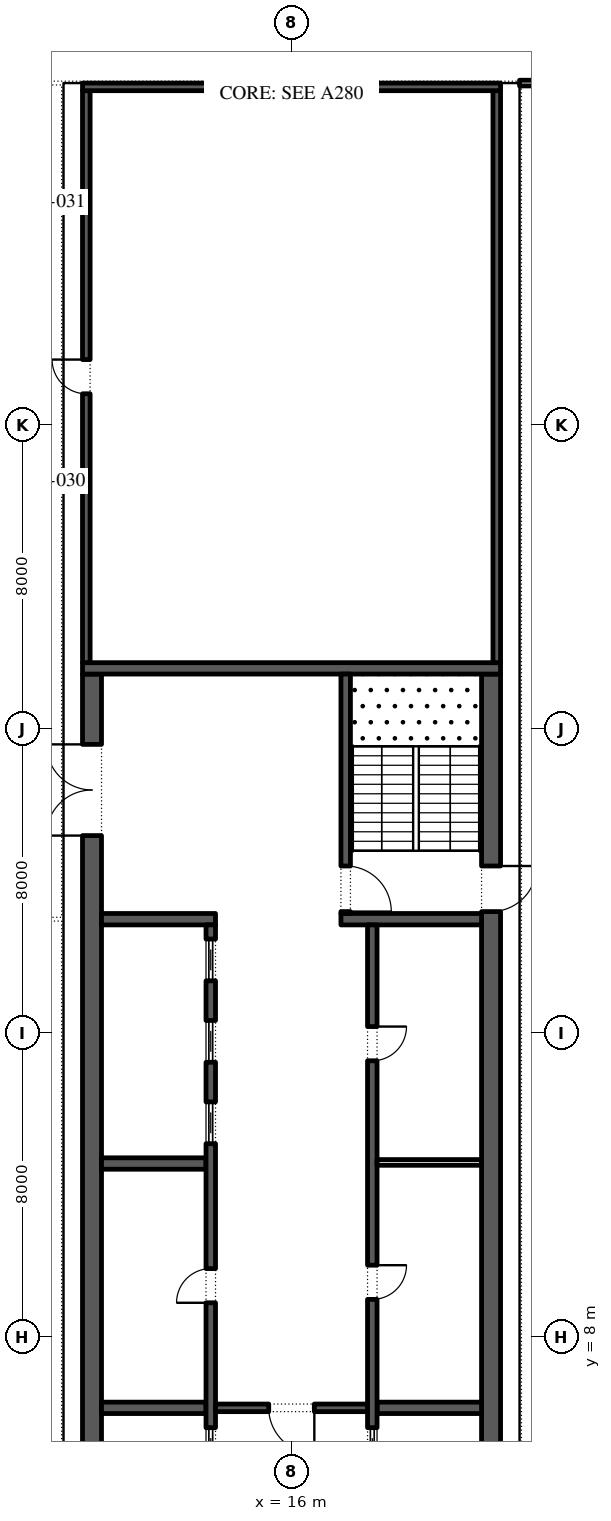
"""IFC4 building model, lengths in metres.
Left out: names, types, materials, properties, quantities, classifications, styles, units other than length and angle.
Written with IfcOpenShell. Run it as: python <this file> out.ifc"""

import sys

from ifc_helpers import new_model, si_unit, direction, frame, frame_2d, origin, place, context, subcontext, project, spatial, rectangle, extrude, element, fill, save


model = new_model("IFC4")
c1 = context("Model", 3, precision=1e-05, world=origin(), true_north=direction((0.0, 1.0)))
c2 = subcontext(c1, "Body", "Model", "MODEL_VIEW")
j1 = project(units=[si_unit("LENGTHUNIT", "METRE"), si_unit("PLANEANGLEUNIT", "RADIAN")], contexts=[c1])
p1 = place(None, origin())
s1 = spatial("IfcSite", under=j1, at=p1, CompositionType="ELEMENT")
p2 = place(p1, origin())
s2 = spatial("IfcBuilding", under=s1, at=p2, CompositionType="ELEMENT")
p3 = place(p2, frame((0.0, 0.0, 351.0)))
s3 = spatial("IfcBuildingStorey", under=s2, at=p3, CompositionType="ELEMENT", Elevation=351.0)
p4 = place(p3, frame((21.25, -2.45, 0.0), z_axis=(0.0, 0.0, 1.0), x_axis=(0.0, 1.0, 0.0)))
e1 = element("IfcWall", 1, at=p4, inside=s3, PredefinedType="SHEAR", context=c2, shape_type="SweptSolid", body=[
    extrude(rectangle(XDim=27.9, YDim=0.5, at=frame_2d((13.95, 0.0))), origin(), (0.0, 0.0, 1.0), 4.0),
])
p5 = place(p4, frame((5.05, 0.0, 0.0)))
e2 = element("IfcOpeningElement", 2, at=p5, cuts=e1, PredefinedType="OPENING", context=c2, shape_type="SweptSolid", body=[
    extrude(rectangle(XDim=1.2, YDim=2.1, at=frame_2d((0.6, 1.05))), frame((0.0, 0.26, 0.0), z_axis=(0.0, -1.0, 0.0), x_axis=(1.0, 0.0, 0.0)), (0.0, 0.0, 1.0), 0.52),
])
p6 = place(p4, frame((21.65, 0.0, 0.0)))
e3 = element("IfcOpeningElement", 3, at=p6, cuts=e1, PredefinedType="OPENING", context=c2, shape_type="SweptSolid", body=[
    extrude(rectangle(XDim=1.2, YDim=2.1, at=frame_2d((0.6, 1.05))), frame((0.0, 0.26, 0.0), z_axis=(0.0, -1.0, 0.0), x_axis=(1.0, 0.0, 0.0)), (0.0, 0.0, 1.0), 0.52),
])
p7 = place(p3, frame((10.75, -2.45, 0.0), z_axis=(0.0, 0.0, 1.0), x_axis=(0.0, 1.0, 0.0)))
e4 = element("IfcWall", 4, at=p7, inside=s3, PredefinedType="SHEAR", context=c2, shape_type="SweptSolid", body=[
    extrude(rectangle(XDim=27.9, YDim=0.5, at=frame_2d((13.95, 0.0))), origin(), (0.0, 0.0, 1.0), 4.0),
])
p8 = place(p7, frame((23.65, 0.0, 0.0)))
e5 = element("IfcOpeningElement", 5, at=p8, cuts=e4, PredefinedType="OPENING", context=c2, shape_type="SweptSolid", body=[
    extrude(rectangle(XDim=2.4, YDim=2.1, at=frame_2d((1.2, 1.05))), frame((0.0, 0.26, 0.0), z_axis=(0.0, -1.0, 0.0), x_axis=(1.0, 0.0, 0.0)), (0.0, 0.0, 1.0), 0.52),
])
p9 = place(p7, frame((0.788, 0.0, 0.0)))
e6 = element("IfcOpeningElement", 6, at=p9, cuts=e4, PredefinedType="OPENING", context=c2, shape_type="SweptSolid", body=[
    extrude(rectangle(XDim=0.9, YDim=2.1, at=frame_2d((0.45, 1.05))), frame((0.0, 0.26, 0.0), z_axis=(0.0, -1.0, 0.0), x_axis=(1.0, 0.0, 0.0)), (0.0, 0.0, 1.0), 0.52),
])
p10 = place(p7, frame((3.962, 0.0, 0.0)))
e7 = element("IfcOpeningElement", 7, at=p10, cuts=e4, PredefinedType="OPENING", context=c2, shape_type="SweptSolid", body=[
    extrude(rectangle(XDim=1.0, YDim=2.1, at=frame_2d((0.5, 1.05))), frame((0.0, 0.26, 0.0), z_axis=(0.0, -1.0, 0.0), x_axis=(1.0, 0.0, 0.0)), (0.0, 0.0, 1.0), 0.52),
])
p11 = place(p3, frame((10.5, 25.6, 0.0), z_axis=(0.0, 0.0, 1.0), x_axis=(1.0, 0.0, 0.0)))
e8 = element("IfcWall", 8, at=p11, inside=s3, PredefinedType="SHEAR", context=c2, shape_type="SweptSolid", body=[
    extrude(rectangle(XDim=11.0, YDim=0.3, at=frame_2d((5.5, 0.0))), origin(), (0.0, 0.0, 1.0), 4.0),
])
p12 = place(p3, frame((17.3, 19.0, 0.0), z_axis=(0.0, 0.0, 1.0), x_axis=(1.0, 0.0, 0.0)))
e9 = element("IfcWall", 9, at=p12, inside=s3, PredefinedType="SHEAR", context=c2, shape_type="SweptSolid", body=[
    extrude(rectangle(XDim=3.7, YDim=0.3, at=frame_2d((1.85, 0.0))), origin(), (0.0, 0.0, 1.0), 4.0),
])
p13 = place(p3, frame((17.425, 19.15, 0.0), z_axis=(0.0, 0.0, 1.0), x_axis=(0.0, 1.0, 0.0)))
e10 = element("IfcWall", 10, at=p13, inside=s3, PredefinedType="SHEAR", context=c2, shape_type="SweptSolid", body=[
    extrude(rectangle(XDim=6.3, YDim=0.25, at=frame_2d((3.15, 0.0))), origin(), (0.0, 0.0, 1.0), 4.0),
])
p14 = place(p13, frame((0.05, 0.0, 0.0)))
e11 = element("IfcOpeningElement", 11, at=p14, cuts=e10, PredefinedType="OPENING", context=c2, shape_type="SweptSolid", body=[
    extrude(rectangle(XDim=1.2, YDim=2.1, at=frame_2d((0.6, 1.05))), frame((0.0, 0.135, 0.0), z_axis=(0.0, -1.0, 0.0), x_axis=(1.0, 0.0, 0.0)), (0.0, 0.0, 1.0), 0.27),
])
p15 = place(p3, frame((18.25, 6.143, 0.0), z_axis=(0.0, 0.0, 1.0), x_axis=(1.0, 0.0, 0.0)))
e12 = element("IfcWall", 12, at=p15, inside=s3, PredefinedType="SHEAR", context=c2, shape_type="SweptSolid", body=[
    extrude(rectangle(XDim=2.75, YDim=0.3, at=frame_2d((1.375, 0.0))), origin(), (0.0, 0.0, 1.0), 4.0),
])
p16 = place(p3, frame((18.125, 4.15, 0.0), z_axis=(0.0, 0.0, 1.0), x_axis=(0.0, 1.0, 0.0)))
e13 = element("IfcWall", 13, at=p16, inside=s3, PredefinedType="SHEAR", context=c2, shape_type="SweptSolid", body=[
    extrude(rectangle(XDim=14.7, YDim=0.25, at=frame_2d((7.35, 0.0))), origin(), (0.0, 0.0, 1.0), 4.0),
])
p17 = place(p16, frame((4.846, 0.0, 0.0)))
e14 = element("IfcOpeningElement", 14, at=p17, cuts=e13, PredefinedType="OPENING", context=c2, shape_type="SweptSolid", body=[
    extrude(rectangle(XDim=0.9, YDim=2.1, at=frame_2d((0.45, 1.05))), frame((0.0, 0.135, 0.0), z_axis=(0.0, -1.0, 0.0), x_axis=(1.0, 0.0, 0.0)), (0.0, 0.0, 1.0), 0.27),
])
p18 = place(p16, frame((11.125, 0.0, 0.0)))
e15 = element("IfcOpeningElement", 15, at=p18, cuts=e13, PredefinedType="OPENING", context=c2, shape_type="SweptSolid", body=[
    extrude(rectangle(XDim=0.9, YDim=2.1, at=frame_2d((0.45, 1.05))), frame((0.0, 0.135, 0.0), z_axis=(0.0, -1.0, 0.0), x_axis=(1.0, 0.0, 0.0)), (0.0, 0.0, 1.0), 0.27),
])
p19 = place(p16, frame((0.371, 0.0, 0.0)))
e16 = element("IfcOpeningElement", 16, at=p19, cuts=e13, PredefinedType="OPENING", context=c2, shape_type="SweptSolid", body=[
    extrude(rectangle(XDim=1.1, YDim=2.1, at=frame_2d((0.55, 1.05))), frame((0.0, 0.135, 0.0), z_axis=(0.0, -1.0, 0.0), x_axis=(1.0, 0.0, 0.0)), (0.0, 0.0, 1.0), 0.27),
])
p20 = place(p3, frame((18.25, 12.6, 0.0), z_axis=(0.0, 0.0, 1.0), x_axis=(1.0, 0.0, 0.0)))
e17 = element("IfcWall", 17, at=p20, inside=s3, PredefinedType="PARTITIONING", context=c2, shape_type="SweptSolid", body=[
    extrude(rectangle(XDim=2.75, YDim=0.15, at=frame_2d((1.375, 0.0))), origin(), (0.0, 0.0, 1.0), 4.0),
])
for number, where, z_axis, x_axis in (
    (18, (11.0, 6.143, 0.0), (0.0, 0.0, 1.0), (1.0, 0.0, 0.0)),
    (19, (11.0, 12.571, 0.0), (0.0, 0.0, 1.0), (1.0, 0.0, 0.0)),
):
    element("IfcWall", number, at=place(p3, frame(where, z_axis=z_axis, x_axis=x_axis)), inside=s3, PredefinedType="SHEAR", context=c2, shape_type="SweptSolid", body=[
        extrude(rectangle(XDim=2.75, YDim=0.3, at=frame_2d((1.375, 0.0))), origin(), (0.0, 0.0, 1.0), 4.0),
    ])
p21 = place(p3, frame((11.0, 19.0, 0.0), z_axis=(0.0, 0.0, 1.0), x_axis=(1.0, 0.0, 0.0)))
e20 = element("IfcWall", 20, at=p21, inside=s3, PredefinedType="SHEAR", context=c2, shape_type="SweptSolid", body=[
    extrude(rectangle(XDim=3.0, YDim=0.3, at=frame_2d((1.5, 0.0))), origin(), (0.0, 0.0, 1.0), 4.0),
])
p22 = place(p3, frame((13.875, -2.45, 0.0), z_axis=(0.0, 0.0, 1.0), x_axis=(0.0, 1.0, 0.0)))
e21 = element("IfcWall", 21, at=p22, inside=s3, PredefinedType="SHEAR", context=c2, shape_type="SweptSolid", body=[
    extrude(rectangle(XDim=21.3, YDim=0.25, at=frame_2d((10.65, 0.0))), origin(), (0.0, 0.0, 1.0), 4.0),
])
p23 = place(p22, frame((11.357, 0.0, 0.0)))
e22 = element("IfcOpeningElement", 22, at=p23, cuts=e21, PredefinedType="OPENING", context=c2, shape_type="SweptSolid", body=[
    extrude(rectangle(XDim=0.9, YDim=2.1, at=frame_2d((0.45, 1.05))), frame((0.0, 0.135, 0.0), z_axis=(0.0, -1.0, 0.0), x_axis=(1.0, 0.0, 0.0)), (0.0, 0.0, 1.0), 0.27),
])
p24 = place(p22, frame((6.971, 0.0, 0.0)))
e23 = element("IfcOpeningElement", 23, at=p24, cuts=e21, PredefinedType="OPENING", context=c2, shape_type="SweptSolid", body=[
    extrude(rectangle(XDim=1.1, YDim=2.1, at=frame_2d((0.55, 1.05))), frame((0.0, 0.135, 0.0), z_axis=(0.0, -1.0, 0.0), x_axis=(1.0, 0.0, 0.0)), (0.0, 0.0, 1.0), 0.27),
])
p25 = place(p22, frame((15.543, 0.0, 0.0)))
e24 = element("IfcOpeningElement", 24, at=p25, cuts=e21, PredefinedType="OPENING", context=c2, shape_type="SweptSolid", body=[
    extrude(rectangle(XDim=1.1, YDim=2.1, at=frame_2d((0.55, 1.05))), frame((0.0, 0.135, 0.0), z_axis=(0.0, -1.0, 0.0), x_axis=(1.0, 0.0, 0.0)), (0.0, 0.0, 1.0), 0.27),
])
p26 = place(p22, frame((17.686, 0.0, 0.0)))
e25 = element("IfcOpeningElement", 25, at=p26, cuts=e21, PredefinedType="OPENING", context=c2, shape_type="SweptSolid", body=[
    extrude(rectangle(XDim=1.1, YDim=2.1, at=frame_2d((0.55, 1.05))), frame((0.0, 0.135, 0.0), z_axis=(0.0, -1.0, 0.0), x_axis=(1.0, 0.0, 0.0)), (0.0, 0.0, 1.0), 0.27),
])
p27 = place(p22, frame((19.829, 0.0, 0.0)))
e26 = element("IfcOpeningElement", 26, at=p27, cuts=e21, PredefinedType="OPENING", context=c2, shape_type="SweptSolid", body=[
    extrude(rectangle(XDim=1.1, YDim=2.1, at=frame_2d((0.55, 1.05))), frame((0.0, 0.135, 0.0), z_axis=(0.0, -1.0, 0.0), x_axis=(1.0, 0.0, 0.0)), (0.0, 0.0, 1.0), 0.27),
])
p28 = place(p3, frame((14.0, 6.143, 0.0), z_axis=(0.0, 0.0, 1.0), x_axis=(1.0, 0.0, 0.0)))
e27 = element("IfcWall", 27, at=p28, inside=s3, PredefinedType="SHEAR", context=c2, shape_type="SweptSolid", body=[
    extrude(rectangle(XDim=4.0, YDim=0.2, at=frame_2d((2.0, 0.0))), origin(), (0.0, 0.0, 1.0), 4.0),
])
p29 = place(p28, frame((1.4, 0.0, 0.0)))
e28 = element("IfcOpeningElement", 28, at=p29, cuts=e27, PredefinedType="OPENING", context=c2, shape_type="SweptSolid", body=[
    extrude(rectangle(XDim=1.2, YDim=2.1, at=frame_2d((0.6, 1.05))), frame((0.0, 0.11, 0.0), z_axis=(0.0, -1.0, 0.0), x_axis=(1.0, 0.0, 0.0)), (0.0, 0.0, 1.0), 0.22),
])
p30 = place(p3, frame((21.4, 25.75, 0.0), z_axis=(0.0, 0.0, 1.0), x_axis=(0.0, 1.0, 0.0)))
e29 = element("IfcWall", 29, at=p30, inside=s3, PredefinedType="SHEAR", context=c2, shape_type="SweptSolid", body=[
    extrude(rectangle(XDim=15.05, YDim=0.2, at=frame_2d((7.525, 0.0))), origin(), (0.0, 0.0, 1.0), 4.0),
])
p31 = place(p3, frame((10.6, 25.75, 0.0), z_axis=(0.0, 0.0, 1.0), x_axis=(0.0, 1.0, 0.0)))
e30 = element("IfcWall", 30, at=p31, inside=s3, PredefinedType="SHEAR", context=c2, shape_type="SweptSolid", body=[
    extrude(rectangle(XDim=15.05, YDim=0.2, at=frame_2d((7.525, 0.0))), origin(), (0.0, 0.0, 1.0), 4.0),
])
p32 = place(p31, frame((7.075, 0.0, 0.0)))
e31 = element("IfcOpeningElement", 31, at=p32, cuts=e30, PredefinedType="OPENING", context=c2, shape_type="SweptSolid", body=[
    extrude(rectangle(XDim=0.9, YDim=2.1, at=frame_2d((0.45, 1.05))), frame((0.0, 0.11, 0.0), z_axis=(0.0, -1.0, 0.0), x_axis=(1.0, 0.0, 0.0)), (0.0, 0.0, 1.0), 0.22),
])
p33 = place(p3, frame((10.5, 40.9, 0.0), z_axis=(0.0, 0.0, 1.0), x_axis=(1.0, 0.0, 0.0)))
e32 = element("IfcWall", 32, at=p33, inside=s3, PredefinedType="SHEAR", context=c2, shape_type="SweptSolid", body=[
    extrude(rectangle(XDim=11.0, YDim=0.2, at=frame_2d((5.5, 0.0))), origin(), (0.0, 0.0, 1.0), 4.0),
])
p34 = place(p3, frame((26.05, 41.0, 0.0), z_axis=(0.0, 0.0, 1.0), x_axis=(-1.0, 0.0, 0.0)))
e33 = element("IfcWall", 33, at=p34, inside=s3, PredefinedType="PARTITIONING", context=c2, shape_type="SweptSolid", body=[
    extrude(rectangle(XDim=4.05, YDim=0.15, at=frame_2d((2.025, 0.0))), origin(), (0.0, 0.0, 1.0), 4.0),
])
p35 = place(p34, frame((1.9, 0.0, 0.0)))
e34 = element("IfcOpeningElement", 34, at=p35, cuts=e33, PredefinedType="OPENING", context=c2, shape_type="SweptSolid", body=[
    extrude(rectangle(XDim=1.0, YDim=2.1, at=frame_2d((0.5, 1.05))), frame((0.0, 0.085, 0.0), z_axis=(0.0, -1.0, 0.0), x_axis=(1.0, 0.0, 0.0)), (0.0, 0.0, 1.0), 0.17),
])
p36 = place(p17, frame((0.9, -0.2, 0.0), z_axis=(0.0, 0.0, 1.0), x_axis=(-1.0, 0.0, 0.0)))
e35 = element("IfcDoor", 35, at=p36, inside=s3, OperationType="SINGLE_SWING_RIGHT", PredefinedType="DOOR", context=c2, shape_type="SweptSolid", body=[
    extrude(rectangle(XDim=0.9, YDim=2.1, at=frame_2d((0.45, 1.05))), frame((0.0, -0.075, 0.0), z_axis=(0.0, -1.0, 0.0), x_axis=(1.0, 0.0, 0.0)), (0.0, 0.0, 1.0), 0.05),
])
fill(e14, e35)
p37 = place(p18, frame((0.9, -0.2, 0.0), z_axis=(0.0, 0.0, 1.0), x_axis=(-1.0, 0.0, 0.0)))
e36 = element("IfcDoor", 36, at=p37, inside=s3, OperationType="SINGLE_SWING_RIGHT", PredefinedType="DOOR", context=c2, shape_type="SweptSolid", body=[
    extrude(rectangle(XDim=0.9, YDim=2.1, at=frame_2d((0.45, 1.05))), frame((0.0, -0.075, 0.0), z_axis=(0.0, -1.0, 0.0), x_axis=(1.0, 0.0, 0.0)), (0.0, 0.0, 1.0), 0.05),
])
fill(e15, e36)
p38 = place(p19, origin())
e37 = element("IfcDoor", 37, at=p38, inside=s3, OperationType="SLIDING_TO_LEFT", PredefinedType="DOOR", context=c2, shape_type="SweptSolid", body=[
    extrude(rectangle(XDim=1.1, YDim=2.1, at=frame_2d((0.55, 1.05))), frame((0.0, 0.025, 0.0), z_axis=(0.0, -1.0, 0.0), x_axis=(1.0, 0.0, 0.0)), (0.0, 0.0, 1.0), 0.05),
])
fill(e16, e37)
p39 = place(p23, origin())
e38 = element("IfcDoor", 38, at=p39, inside=s3, OperationType="SINGLE_SWING_RIGHT", PredefinedType="DOOR", context=c2, shape_type="SweptSolid", body=[
    extrude(rectangle(XDim=0.9, YDim=2.1, at=frame_2d((0.45, 1.05))), frame((0.0, 0.125, 0.0), z_axis=(0.0, -1.0, 0.0), x_axis=(1.0, 0.0, 0.0)), (0.0, 0.0, 1.0), 0.05),
])
fill(e22, e38)
p40 = place(p24, origin())
e39 = element("IfcDoor", 39, at=p40, inside=s3, OperationType="SLIDING_TO_LEFT", PredefinedType="DOOR", context=c2, shape_type="SweptSolid", body=[
    extrude(rectangle(XDim=1.1, YDim=2.1, at=frame_2d((0.55, 1.05))), frame((0.0, 0.025, 0.0), z_axis=(0.0, -1.0, 0.0), x_axis=(1.0, 0.0, 0.0)), (0.0, 0.0, 1.0), 0.05),
])
fill(e23, e39)
p41 = place(p25, origin())
e40 = element("IfcDoor", 40, at=p41, inside=s3, OperationType="SLIDING_TO_LEFT", PredefinedType="DOOR", context=c2, shape_type="SweptSolid", body=[
    extrude(rectangle(XDim=1.1, YDim=2.1, at=frame_2d((0.55, 1.05))), frame((0.0, 0.025, 0.0), z_axis=(0.0, -1.0, 0.0), x_axis=(1.0, 0.0, 0.0)), (0.0, 0.0, 1.0), 0.05),
])
fill(e24, e40)
p42 = place(p26, origin())
e41 = element("IfcDoor", 41, at=p42, inside=s3, OperationType="SLIDING_TO_LEFT", PredefinedType="DOOR", context=c2, shape_type="SweptSolid", body=[
    extrude(rectangle(XDim=1.1, YDim=2.1, at=frame_2d((0.55, 1.05))), frame((0.0, 0.025, 0.0), z_axis=(0.0, -1.0, 0.0), x_axis=(1.0, 0.0, 0.0)), (0.0, 0.0, 1.0), 0.05),
])
fill(e25, e41)
p43 = place(p27, origin())
e42 = element("IfcDoor", 42, at=p43, inside=s3, OperationType="SLIDING_TO_LEFT", PredefinedType="DOOR", context=c2, shape_type="SweptSolid", body=[
    extrude(rectangle(XDim=1.1, YDim=2.1, at=frame_2d((0.55, 1.05))), frame((0.0, 0.025, 0.0), z_axis=(0.0, -1.0, 0.0), x_axis=(1.0, 0.0, 0.0)), (0.0, 0.0, 1.0), 0.05),
])
fill(e26, e42)
p44 = place(p29, frame((1.2, 0.0, 0.0), z_axis=(0.0, 0.0, 1.0), x_axis=(-1.0, 0.0, 0.0)))
e43 = element("IfcDoor", 43, at=p44, inside=s3, OperationType="SINGLE_SWING_RIGHT", PredefinedType="DOOR", context=c2, shape_type="SweptSolid", body=[
    extrude(rectangle(XDim=1.2, YDim=2.1, at=frame_2d((0.6, 1.05))), frame((0.0, 0.025, 0.0), z_axis=(0.0, -1.0, 0.0), x_axis=(1.0, 0.0, 0.0)), (0.0, 0.0, 1.0), 0.05),
])
fill(e28, e43)
p45 = place(p8, origin())
e44 = element("IfcDoor", 44, at=p45, inside=s3, OperationType="DOUBLE_DOOR_SINGLE_SWING", PredefinedType="DOOR", context=c2, shape_type="SweptSolid", body=[
    extrude(rectangle(XDim=2.4, YDim=2.1, at=frame_2d((1.2, 1.05))), frame((0.0, 0.025, 0.0), z_axis=(0.0, -1.0, 0.0), x_axis=(1.0, 0.0, 0.0)), (0.0, 0.0, 1.0), 0.05),
])
fill(e5, e44)
p46 = place(p14, frame((1.2, 0.0, 0.0), z_axis=(0.0, 0.0, 1.0), x_axis=(-1.0, 0.0, 0.0)))
e45 = element("IfcDoor", 45, at=p46, inside=s3, OperationType="SINGLE_SWING_LEFT", PredefinedType="DOOR", context=c2, shape_type="SweptSolid", body=[
    extrude(rectangle(XDim=1.2, YDim=2.1, at=frame_2d((0.6, 1.05))), frame((0.0, 0.025, 0.0), z_axis=(0.0, -1.0, 0.0), x_axis=(1.0, 0.0, 0.0)), (0.0, 0.0, 1.0), 0.05),
])
fill(e11, e45)
p47 = place(p6, frame((1.2, 0.0, 0.0), z_axis=(0.0, 0.0, 1.0), x_axis=(-1.0, 0.0, 0.0)))
e46 = element("IfcDoor", 46, at=p47, inside=s3, OperationType="SINGLE_SWING_RIGHT", PredefinedType="DOOR", context=c2, shape_type="SweptSolid", body=[
    extrude(rectangle(XDim=1.2, YDim=2.1, at=frame_2d((0.6, 1.05))), frame((0.0, 0.025, 0.0), z_axis=(0.0, -1.0, 0.0), x_axis=(1.0, 0.0, 0.0)), (0.0, 0.0, 1.0), 0.05),
])
fill(e3, e46)
p48 = place(p32, origin())
e47 = element("IfcDoor", 47, at=p48, inside=s3, OperationType="SINGLE_SWING_LEFT", PredefinedType="DOOR", context=c2, shape_type="SweptSolid", body=[
    extrude(rectangle(XDim=0.9, YDim=2.1, at=frame_2d((0.45, 1.05))), frame((0.0, -0.05, 0.0), z_axis=(0.0, -1.0, 0.0), x_axis=(1.0, 0.0, 0.0)), (0.0, 0.0, 1.0), 0.05),
])
fill(e31, e47)
save(model, sys.argv[1])
